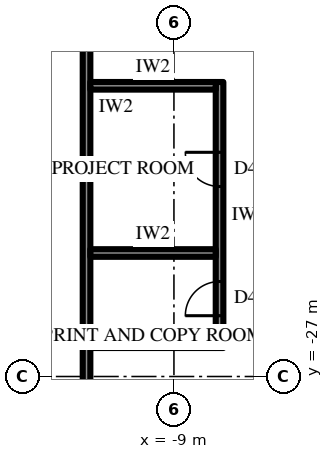
"""IFC4 building model, lengths in metres.
Left out: names, types, materials, properties, quantities, classifications, styles, units other than length and angle.
Written with IfcOpenShell. Run it as: python <this file> out.ifc"""

import sys

from ifc_helpers import new_model, si_unit, direction, frame, frame_2d, origin, place, context, subcontext, project, spatial, rectangle, extrude, element, fill, save


model = new_model("IFC4")
c1 = context("Model", 3, precision=1e-05, world=origin(), true_north=direction((0.0, 1.0)))
c2 = subcontext(c1, "Body", "Model", "MODEL_VIEW")
j1 = project(units=[si_unit("LENGTHUNIT", "METRE"), si_unit("PLANEANGLEUNIT", "RADIAN")], contexts=[c1])
p1 = place(None, origin())
s1 = spatial("IfcSite", under=j1, at=p1, CompositionType="ELEMENT")
p2 = place(p1, origin())
s2 = spatial("IfcBuilding", under=s1, at=p2, CompositionType="ELEMENT")
p3 = place(p2, frame((0.0, 0.0, 190.9)))
s3 = spatial("IfcBuildingStorey", under=s2, at=p3, CompositionType="ELEMENT", Elevation=190.9)
p4 = place(p3, frame((-11.3, -12.3, 0.0), z_axis=(0.0, 0.0, 1.0), x_axis=(0.0, -1.0, 0.0)))
e1 = element("IfcWall", 1, at=p4, inside=s3, PredefinedType="PARTITIONING", context=c2, shape_type="SweptSolid", body=[
    extrude(rectangle(XDim=19.0, YDim=0.2, at=frame_2d((9.5, 0.0))), origin(), (0.0, 0.0, 1.0), 4.0),
])
p5 = place(p4, frame((1.4, 0.0, 0.0)))
e2 = element("IfcOpeningElement", 2, at=p5, cuts=e1, PredefinedType="OPENING", context=c2, shape_type="SweptSolid", body=[
    extrude(rectangle(XDim=1.0, YDim=2.2, at=frame_2d((0.5, 1.1))), frame((0.0, 0.11, 0.0), z_axis=(0.0, -1.0, 0.0), x_axis=(1.0, 0.0, 0.0)), (0.0, 0.0, 1.0), 0.22),
])
p6 = place(p3, frame((-7.8, -19.25, 0.0), z_axis=(0.0, 0.0, 1.0), x_axis=(0.0, -1.0, 0.0)))
e3 = element("IfcWall", 3, at=p6, inside=s3, PredefinedType="PARTITIONING", context=c2, shape_type="SweptSolid", body=[
    extrude(rectangle(XDim=7.0, YDim=0.2, at=frame_2d((3.5, 0.0))), origin(), (0.0, 0.0, 1.0), 4.0),
])
p7 = place(p6, frame((1.85, 0.0, 0.0)))
e4 = element("IfcOpeningElement", 4, at=p7, cuts=e3, PredefinedType="OPENING", context=c2, shape_type="SweptSolid", body=[
    extrude(rectangle(XDim=0.9, YDim=2.2, at=frame_2d((0.45, 1.1))), frame((0.0, 0.11, 0.0), z_axis=(0.0, -1.0, 0.0), x_axis=(1.0, 0.0, 0.0)), (0.0, 0.0, 1.0), 0.22),
])
p8 = place(p6, frame((5.25, 0.0, 0.0)))
e5 = element("IfcOpeningElement", 5, at=p8, cuts=e3, PredefinedType="OPENING", context=c2, shape_type="SweptSolid", body=[
    extrude(rectangle(XDim=0.9, YDim=2.2, at=frame_2d((0.45, 1.1))), frame((0.0, 0.11, 0.0), z_axis=(0.0, -1.0, 0.0), x_axis=(1.0, 0.0, 0.0)), (0.0, 0.0, 1.0), 0.22),
])
for number, where, z_axis, x_axis in (
    (6, (-11.2, -19.35, 0.0), (0.0, 0.0, 1.0), (1.0, 0.0, 0.0)),
    (7, (-11.2, -23.75, 0.0), (0.0, 0.0, 1.0), (1.0, 0.0, 0.0)),
    (8, (-11.2, -26.15, 0.0), (0.0, 0.0, 1.0), (1.0, 0.0, 0.0)),
):
    element("IfcWall", number, at=place(p3, frame(where, z_axis=z_axis, x_axis=x_axis)), inside=s3, PredefinedType="PARTITIONING", context=c2, shape_type="SweptSolid", body=[
        extrude(rectangle(XDim=3.3, YDim=0.2, at=frame_2d((1.65, 0.0))), origin(), (0.0, 0.0, 1.0), 4.0),
    ])
p9 = place(p7, frame((0.9, 0.0, 0.0), z_axis=(0.0, 0.0, 1.0), x_axis=(-1.0, 0.0, 0.0)))
e9 = element("IfcDoor", 9, at=p9, inside=s3, OperationType="SINGLE_SWING_LEFT", PredefinedType="DOOR", context=c2, shape_type="SweptSolid", body=[
    extrude(rectangle(XDim=0.9, YDim=2.2, at=frame_2d((0.45, 1.1))), frame((0.0, 0.025, 0.0), z_axis=(0.0, -1.0, 0.0), x_axis=(1.0, 0.0, 0.0)), (0.0, 0.0, 1.0), 0.05),
])
fill(e4, e9)
p10 = place(p8, frame((0.9, 0.0, 0.0), z_axis=(0.0, 0.0, 1.0), x_axis=(-1.0, 0.0, 0.0)))
e10 = element("IfcDoor", 10, at=p10, inside=s3, OperationType="SINGLE_SWING_RIGHT", PredefinedType="DOOR", context=c2, shape_type="SweptSolid", body=[
    extrude(rectangle(XDim=0.9, YDim=2.2, at=frame_2d((0.45, 1.1))), frame((0.0, 0.025, 0.0), z_axis=(0.0, -1.0, 0.0), x_axis=(1.0, 0.0, 0.0)), (0.0, 0.0, 1.0), 0.05),
])
fill(e5, e10)
save(model, sys.argv[1])
